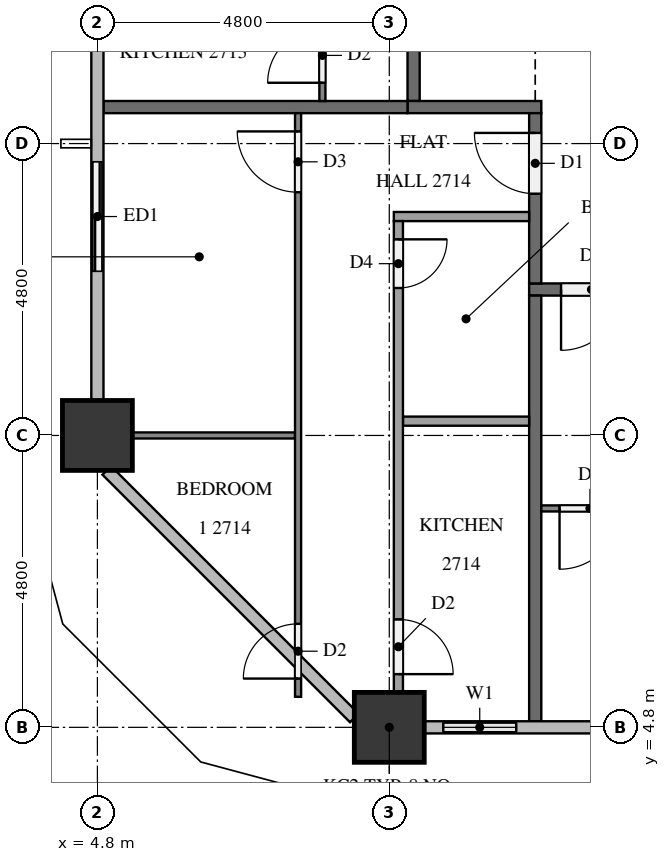
"""IFC4 building model, lengths in metres.
Left out: names, types, materials, properties, quantities, classifications, styles, units other than length and angle.
Written with IfcOpenShell. Run it as: python <this file> out.ifc"""

import sys

from ifc_helpers import new_model, si_unit, direction, frame, frame_2d, origin, origin_2d, place, context, subcontext, project, spatial, rectangle, extrude, element, fill, save


model = new_model("IFC4")
c1 = context("Model", 3, precision=1e-05, world=origin(), true_north=direction((0.0, 1.0)))
c2 = subcontext(c1, "Body", "Model", "MODEL_VIEW")
j1 = project(units=[si_unit("LENGTHUNIT", "METRE"), si_unit("PLANEANGLEUNIT", "RADIAN")], contexts=[c1])
p1 = place(None, origin())
s1 = spatial("IfcSite", under=j1, at=p1, CompositionType="ELEMENT")
p2 = place(p1, origin())
s2 = spatial("IfcBuilding", under=s1, at=p2, CompositionType="ELEMENT")
p3 = place(p2, frame((0.0, 0.0, 106.7)))
s3 = spatial("IfcBuildingStorey", under=s2, at=p3, CompositionType="ELEMENT", Elevation=106.7)
for number, where, z_axis, x_axis in (
    (1, (9.6, 4.8, 0.0), (0.0, 0.0, 1.0), (1.0, 0.0, 0.0)),
    (2, (4.8, 9.6, 0.0), (0.0, 0.0, 1.0), (1.0, 0.0, 0.0)),
):
    element("IfcColumn", number, at=place(p3, frame(where, z_axis=z_axis, x_axis=x_axis)), inside=s3, PredefinedType="COLUMN", context=c2, shape_type="SweptSolid", body=[
        extrude(rectangle(XDim=1.15, YDim=1.15, at=origin_2d()), origin(), (0.0, 0.0, 1.0), 3.2),
    ])
p4 = place(p3, frame((10.175, 4.8, 0.0), z_axis=(0.0, 0.0, 1.0), x_axis=(1.0, 0.0, 0.0)))
e3 = element("IfcWall", 3, at=p4, inside=s3, PredefinedType="SOLIDWALL", context=c2, shape_type="SweptSolid", body=[
    extrude(rectangle(XDim=1.825, YDim=0.15, at=frame_2d((0.913, 0.0))), origin(), (0.0, 0.0, 1.0), 3.2),
])
p5 = place(p4, frame((0.312, 0.0, 0.9)))
e4 = element("IfcOpeningElement", 4, at=p5, cuts=e3, PredefinedType="OPENING", context=c2, shape_type="SweptSolid", body=[
    extrude(rectangle(XDim=1.2, YDim=1.4, at=frame_2d((0.6, 0.7))), frame((0.0, 0.085, 0.0), z_axis=(0.0, -1.0, 0.0), x_axis=(1.0, 0.0, 0.0)), (0.0, 0.0, 1.0), 0.17),
])
p6 = place(p3, frame((4.8, 14.4, 0.0), z_axis=(0.0, 0.0, 1.0), x_axis=(0.0, -1.0, 0.0)))
e5 = element("IfcWall", 5, at=p6, inside=s3, PredefinedType="SOLIDWALL", context=c2, shape_type="SweptSolid", body=[
    extrude(rectangle(XDim=2.4, YDim=0.15, at=frame_2d((1.2, 0.0))), origin(), (0.0, 0.0, 1.0), 3.2),
])
p7 = place(p6, frame((0.3, 0.0, 0.0)))
e6 = element("IfcOpeningElement", 6, at=p7, cuts=e5, PredefinedType="OPENING", context=c2, shape_type="SweptSolid", body=[
    extrude(rectangle(XDim=1.8, YDim=2.4, at=frame_2d((0.9, 1.2))), frame((0.0, 0.085, 0.0), z_axis=(0.0, -1.0, 0.0), x_axis=(1.0, 0.0, 0.0)), (0.0, 0.0, 1.0), 0.17),
])
p8 = place(p3, frame((50.5, 12.0, 0.0), z_axis=(0.0, 0.0, 1.0), x_axis=(-1.0, 0.0, 0.0)))
e7 = element("IfcWall", 7, at=p8, inside=s3, PredefinedType="PARTITIONING", context=c2, shape_type="SweptSolid", body=[
    extrude(rectangle(XDim=38.6, YDim=0.2, at=frame_2d((19.3, 0.0))), origin(), (0.0, 0.0, 1.0), 3.2),
])
p9 = place(p8, frame((37.075, 0.0, 0.0)))
e8 = element("IfcOpeningElement", 8, at=p9, cuts=e7, PredefinedType="OPENING", context=c2, shape_type="SweptSolid", body=[
    extrude(rectangle(XDim=1.0, YDim=2.1, at=frame_2d((0.5, 1.05))), frame((0.0, 0.11, 0.0), z_axis=(0.0, -1.0, 0.0), x_axis=(1.0, 0.0, 0.0)), (0.0, 0.0, 1.0), 0.22),
])
p10 = place(p8, frame((22.675, 0.0, 0.0)))
e9 = element("IfcOpeningElement", 9, at=p10, cuts=e7, PredefinedType="OPENING", context=c2, shape_type="SweptSolid", body=[
    extrude(rectangle(XDim=1.0, YDim=2.1, at=frame_2d((0.5, 1.05))), frame((0.0, 0.11, 0.0), z_axis=(0.0, -1.0, 0.0), x_axis=(1.0, 0.0, 0.0)), (0.0, 0.0, 1.0), 0.22),
])
p11 = place(p8, frame((0.525, 0.0, 0.0)))
e10 = element("IfcOpeningElement", 10, at=p11, cuts=e7, PredefinedType="OPENING", context=c2, shape_type="SweptSolid", body=[
    extrude(rectangle(XDim=1.0, YDim=2.1, at=frame_2d((0.5, 1.05))), frame((0.0, 0.11, 0.0), z_axis=(0.0, -1.0, 0.0), x_axis=(1.0, 0.0, 0.0)), (0.0, 0.0, 1.0), 0.22),
])
p12 = place(p3, frame((10.0, 15.1, 0.0), z_axis=(0.0, 0.0, 1.0), x_axis=(0.0, 1.0, 0.0)))
e11 = element("IfcWall", 11, at=p12, inside=s3, PredefinedType="PARTITIONING", context=c2, shape_type="SweptSolid", body=[
    extrude(rectangle(XDim=22.6, YDim=0.2, at=frame_2d((11.3, 0.0))), origin(), (0.0, 0.0, 1.0), 3.2),
])
p13 = place(p12, frame((21.275, 0.0, 0.0)))
e12 = element("IfcOpeningElement", 12, at=p13, cuts=e11, PredefinedType="OPENING", context=c2, shape_type="SweptSolid", body=[
    extrude(rectangle(XDim=1.0, YDim=2.1, at=frame_2d((0.5, 1.05))), frame((0.0, 0.11, 0.0), z_axis=(0.0, -1.0, 0.0), x_axis=(1.0, 0.0, 0.0)), (0.0, 0.0, 1.0), 0.22),
])
p14 = place(p12, frame((7.475, 0.0, 0.0)))
e13 = element("IfcOpeningElement", 13, at=p14, cuts=e11, PredefinedType="OPENING", context=c2, shape_type="SweptSolid", body=[
    extrude(rectangle(XDim=1.0, YDim=2.1, at=frame_2d((0.5, 1.05))), frame((0.0, 0.11, 0.0), z_axis=(0.0, -1.0, 0.0), x_axis=(1.0, 0.0, 0.0)), (0.0, 0.0, 1.0), 0.22),
])
p15 = place(p3, frame((9.9, 15.0, 0.0), z_axis=(0.0, 0.0, 1.0), x_axis=(1.0, 0.0, 0.0)))
e14 = element("IfcWall", 14, at=p15, inside=s3, PredefinedType="PARTITIONING", context=c2, shape_type="SweptSolid", body=[
    extrude(rectangle(XDim=2.2, YDim=0.2, at=frame_2d((1.1, 0.0))), origin(), (0.0, 0.0, 1.0), 3.2),
])
p16 = place(p3, frame((12.0, 12.1, 0.0), z_axis=(0.0, 0.0, 1.0), x_axis=(0.0, 1.0, 0.0)))
e15 = element("IfcWall", 15, at=p16, inside=s3, PredefinedType="PARTITIONING", context=c2, shape_type="SweptSolid", body=[
    extrude(rectangle(XDim=2.8, YDim=0.2, at=frame_2d((1.4, 0.0))), origin(), (0.0, 0.0, 1.0), 3.2),
])
p17 = place(p16, frame((1.475, 0.0, 0.0)))
e16 = element("IfcOpeningElement", 16, at=p17, cuts=e15, PredefinedType="OPENING", context=c2, shape_type="SweptSolid", body=[
    extrude(rectangle(XDim=1.0, YDim=2.1, at=frame_2d((0.5, 1.05))), frame((0.0, 0.11, 0.0), z_axis=(0.0, -1.0, 0.0), x_axis=(1.0, 0.0, 0.0)), (0.0, 0.0, 1.0), 0.22),
])
p18 = place(p3, frame((12.0, 4.9, 0.0), z_axis=(0.0, 0.0, 1.0), x_axis=(0.0, 1.0, 0.0)))
e17 = element("IfcWall", 17, at=p18, inside=s3, PredefinedType="PARTITIONING", context=c2, shape_type="SweptSolid", body=[
    extrude(rectangle(XDim=7.0, YDim=0.2, at=frame_2d((3.5, 0.0))), origin(), (0.0, 0.0, 1.0), 3.2),
])
p19 = place(p3, frame((4.9, 15.0, 0.0), z_axis=(0.0, 0.0, 1.0), x_axis=(1.0, 0.0, 0.0)))
e18 = element("IfcWall", 18, at=p19, inside=s3, PredefinedType="PARTITIONING", context=c2, shape_type="SweptSolid", body=[
    extrude(rectangle(XDim=5.0, YDim=0.2, at=frame_2d((2.5, 0.0))), origin(), (0.0, 0.0, 1.0), 3.2),
])
p20 = place(p3, frame((26.3, 8.4, 0.0), z_axis=(0.0, 0.0, 1.0), x_axis=(-1.0, 0.0, 0.0)))
e19 = element("IfcWall", 19, at=p20, inside=s3, PredefinedType="PARTITIONING", context=c2, shape_type="SweptSolid", body=[
    extrude(rectangle(XDim=14.2, YDim=0.1, at=frame_2d((7.1, 0.0))), origin(), (0.0, 0.0, 1.0), 3.2),
])
p21 = place(p20, frame((12.9, 0.0, 0.0)))
e20 = element("IfcOpeningElement", 20, at=p21, cuts=e19, PredefinedType="OPENING", context=c2, shape_type="SweptSolid", body=[
    extrude(rectangle(XDim=1.0, YDim=2.1, at=frame_2d((0.5, 1.05))), frame((0.0, 0.06, 0.0), z_axis=(0.0, -1.0, 0.0), x_axis=(1.0, 0.0, 0.0)), (0.0, 0.0, 1.0), 0.12),
])
p22 = place(p20, frame((5.05, 0.0, 0.0)))
e21 = element("IfcOpeningElement", 21, at=p22, cuts=e19, PredefinedType="OPENING", context=c2, shape_type="SweptSolid", body=[
    extrude(rectangle(XDim=0.9, YDim=2.1, at=frame_2d((0.45, 1.05))), frame((0.0, 0.06, 0.0), z_axis=(0.0, -1.0, 0.0), x_axis=(1.0, 0.0, 0.0)), (0.0, 0.0, 1.0), 0.12),
])
p23 = place(p20, frame((3.45, 0.0, 0.0)))
e22 = element("IfcOpeningElement", 22, at=p23, cuts=e19, PredefinedType="OPENING", context=c2, shape_type="SweptSolid", body=[
    extrude(rectangle(XDim=0.9, YDim=2.1, at=frame_2d((0.45, 1.05))), frame((0.0, 0.06, 0.0), z_axis=(0.0, -1.0, 0.0), x_axis=(1.0, 0.0, 0.0)), (0.0, 0.0, 1.0), 0.12),
])
p24 = place(p3, frame((8.5, 15.1, 0.0), z_axis=(0.0, 0.0, 1.0), x_axis=(0.0, 1.0, 0.0)))
e23 = element("IfcWall", 23, at=p24, inside=s3, PredefinedType="PARTITIONING", context=c2, shape_type="SweptSolid", body=[
    extrude(rectangle(XDim=8.8, YDim=0.1, at=frame_2d((4.4, 0.0))), origin(), (0.0, 0.0, 1.0), 3.2),
])
p25 = place(p24, frame((4.45, 0.0, 0.0)))
e24 = element("IfcOpeningElement", 24, at=p25, cuts=e23, PredefinedType="OPENING", context=c2, shape_type="SweptSolid", body=[
    extrude(rectangle(XDim=1.0, YDim=2.1, at=frame_2d((0.5, 1.05))), frame((0.0, 0.06, 0.0), z_axis=(0.0, -1.0, 0.0), x_axis=(1.0, 0.0, 0.0)), (0.0, 0.0, 1.0), 0.12),
])
p26 = place(p24, frame((2.95, 0.0, 0.0)))
e25 = element("IfcOpeningElement", 25, at=p26, cuts=e23, PredefinedType="OPENING", context=c2, shape_type="SweptSolid", body=[
    extrude(rectangle(XDim=0.8, YDim=2.1, at=frame_2d((0.4, 1.05))), frame((0.0, 0.06, 0.0), z_axis=(0.0, -1.0, 0.0), x_axis=(1.0, 0.0, 0.0)), (0.0, 0.0, 1.0), 0.12),
])
p27 = place(p24, frame((0.3, 0.0, 0.0)))
e26 = element("IfcOpeningElement", 26, at=p27, cuts=e23, PredefinedType="OPENING", context=c2, shape_type="SweptSolid", body=[
    extrude(rectangle(XDim=0.9, YDim=2.1, at=frame_2d((0.45, 1.05))), frame((0.0, 0.06, 0.0), z_axis=(0.0, -1.0, 0.0), x_axis=(1.0, 0.0, 0.0)), (0.0, 0.0, 1.0), 0.12),
])
p28 = place(p3, frame((8.05, 9.6, 0.0), z_axis=(0.0, 0.0, 1.0), x_axis=(-1.0, 0.0, 0.0)))
e27 = element("IfcWall", 27, at=p28, inside=s3, PredefinedType="PARTITIONING", context=c2, shape_type="SweptSolid", body=[
    extrude(rectangle(XDim=2.675, YDim=0.1, at=frame_2d((1.337, 0.0))), origin(), (0.0, 0.0, 1.0), 3.2),
])
p29 = place(p3, frame((8.1, 5.302, 0.0), z_axis=(0.0, 0.0, 1.0), x_axis=(0.0, 1.0, 0.0)))
e28 = element("IfcWall", 28, at=p29, inside=s3, PredefinedType="PARTITIONING", context=c2, shape_type="SweptSolid", body=[
    extrude(rectangle(XDim=9.598, YDim=0.1, at=frame_2d((4.799, 0.0))), origin(), (0.0, 0.0, 1.0), 3.2),
])
p30 = place(p29, frame((8.298, 0.0, 0.0)))
e29 = element("IfcOpeningElement", 29, at=p30, cuts=e28, PredefinedType="OPENING", context=c2, shape_type="SweptSolid", body=[
    extrude(rectangle(XDim=1.0, YDim=2.1, at=frame_2d((0.5, 1.05))), frame((0.0, 0.06, 0.0), z_axis=(0.0, -1.0, 0.0), x_axis=(1.0, 0.0, 0.0)), (0.0, 0.0, 1.0), 0.12),
])
p31 = place(p29, frame((0.3, 0.0, 0.0)))
e30 = element("IfcOpeningElement", 30, at=p31, cuts=e28, PredefinedType="OPENING", context=c2, shape_type="SweptSolid", body=[
    extrude(rectangle(XDim=0.9, YDim=2.1, at=frame_2d((0.45, 1.05))), frame((0.0, 0.06, 0.0), z_axis=(0.0, -1.0, 0.0), x_axis=(1.0, 0.0, 0.0)), (0.0, 0.0, 1.0), 0.12),
])
p32 = place(p3, frame((11.9, 9.835, 0.0), z_axis=(0.0, 0.0, 1.0), x_axis=(-1.0, 0.0, 0.0)))
e31 = element("IfcWall", 31, at=p32, inside=s3, PredefinedType="PARTITIONING", context=c2, shape_type="SweptSolid", body=[
    extrude(rectangle(XDim=2.075, YDim=0.15, at=frame_2d((1.038, 0.0))), origin(), (0.0, 0.0, 1.0), 3.2),
])
p33 = place(p3, frame((11.9, 13.2, 0.0), z_axis=(0.0, 0.0, 1.0), x_axis=(-1.0, 0.0, 0.0)))
e32 = element("IfcWall", 32, at=p33, inside=s3, PredefinedType="PARTITIONING", context=c2, shape_type="SweptSolid", body=[
    extrude(rectangle(XDim=2.225, YDim=0.15, at=frame_2d((1.112, 0.0))), origin(), (0.0, 0.0, 1.0), 3.2),
])
p34 = place(p3, frame((9.75, 13.125, 0.0), z_axis=(0.0, 0.0, 1.0), x_axis=(0.0, -1.0, 0.0)))
e33 = element("IfcWall", 33, at=p34, inside=s3, PredefinedType="PARTITIONING", context=c2, shape_type="SweptSolid", body=[
    extrude(rectangle(XDim=7.75, YDim=0.15, at=frame_2d((3.875, 0.0))), origin(), (0.0, 0.0, 1.0), 3.2),
])
p35 = place(p34, frame((0.3, 0.0, 0.0)))
e34 = element("IfcOpeningElement", 34, at=p35, cuts=e33, PredefinedType="OPENING", context=c2, shape_type="SweptSolid", body=[
    extrude(rectangle(XDim=0.8, YDim=2.1, at=frame_2d((0.4, 1.05))), frame((0.0, 0.085, 0.0), z_axis=(0.0, -1.0, 0.0), x_axis=(1.0, 0.0, 0.0)), (0.0, 0.0, 1.0), 0.17),
])
p36 = place(p34, frame((6.55, 0.0, 0.0)))
e35 = element("IfcOpeningElement", 35, at=p36, cuts=e33, PredefinedType="OPENING", context=c2, shape_type="SweptSolid", body=[
    extrude(rectangle(XDim=0.9, YDim=2.1, at=frame_2d((0.45, 1.05))), frame((0.0, 0.085, 0.0), z_axis=(0.0, -1.0, 0.0), x_axis=(1.0, 0.0, 0.0)), (0.0, 0.0, 1.0), 0.17),
])
p37 = place(p5, origin())
e36 = element("IfcWindow", 36, at=p37, inside=s3, PartitioningType="SINGLE_PANEL", PredefinedType="WINDOW", context=c2, shape_type="SweptSolid", body=[
    extrude(rectangle(XDim=1.2, YDim=1.4, at=frame_2d((0.6, 0.7))), frame((0.0, 0.03, 0.0), z_axis=(0.0, -1.0, 0.0), x_axis=(1.0, 0.0, 0.0)), (0.0, 0.0, 1.0), 0.06),
])
fill(e4, e36)
p38 = place(p7, origin())
e37 = element("IfcDoor", 37, at=p38, inside=s3, OperationType="SLIDING_TO_RIGHT", PredefinedType="DOOR", context=c2, shape_type="SweptSolid", body=[
    extrude(rectangle(XDim=1.8, YDim=2.4, at=frame_2d((0.9, 1.2))), frame((0.0, 0.025, 0.0), z_axis=(0.0, -1.0, 0.0), x_axis=(1.0, 0.0, 0.0)), (0.0, 0.0, 1.0), 0.05),
])
fill(e6, e37)
p39 = place(p9, origin())
e38 = element("IfcDoor", 38, at=p39, inside=s3, OperationType="SINGLE_SWING_RIGHT", PredefinedType="DOOR", context=c2, shape_type="SweptSolid", body=[
    extrude(rectangle(XDim=1.0, YDim=2.1, at=frame_2d((0.5, 1.05))), frame((0.0, 0.025, 0.0), z_axis=(0.0, -1.0, 0.0), x_axis=(1.0, 0.0, 0.0)), (0.0, 0.0, 1.0), 0.05),
])
fill(e8, e38)
p40 = place(p17, origin())
e39 = element("IfcDoor", 39, at=p40, inside=s3, OperationType="SINGLE_SWING_RIGHT", PredefinedType="DOOR", context=c2, shape_type="SweptSolid", body=[
    extrude(rectangle(XDim=1.0, YDim=2.1, at=frame_2d((0.5, 1.05))), frame((0.0, 0.025, 0.0), z_axis=(0.0, -1.0, 0.0), x_axis=(1.0, 0.0, 0.0)), (0.0, 0.0, 1.0), 0.05),
])
fill(e16, e39)
p41 = place(p21, origin())
e40 = element("IfcDoor", 40, at=p41, inside=s3, OperationType="SINGLE_SWING_RIGHT", PredefinedType="DOOR", context=c2, shape_type="SweptSolid", body=[
    extrude(rectangle(XDim=1.0, YDim=2.1, at=frame_2d((0.5, 1.05))), frame((0.0, 0.025, 0.0), z_axis=(0.0, -1.0, 0.0), x_axis=(1.0, 0.0, 0.0)), (0.0, 0.0, 1.0), 0.05),
])
fill(e20, e40)
p42 = place(p27, origin())
e41 = element("IfcDoor", 41, at=p42, inside=s3, OperationType="SINGLE_SWING_LEFT", PredefinedType="DOOR", context=c2, shape_type="SweptSolid", body=[
    extrude(rectangle(XDim=0.9, YDim=2.1, at=frame_2d((0.45, 1.05))), frame((0.0, 0.025, 0.0), z_axis=(0.0, -1.0, 0.0), x_axis=(1.0, 0.0, 0.0)), (0.0, 0.0, 1.0), 0.05),
])
fill(e26, e41)
p43 = place(p30, origin())
e42 = element("IfcDoor", 42, at=p43, inside=s3, OperationType="SINGLE_SWING_RIGHT", PredefinedType="DOOR", context=c2, shape_type="SweptSolid", body=[
    extrude(rectangle(XDim=1.0, YDim=2.1, at=frame_2d((0.5, 1.05))), frame((0.0, 0.025, 0.0), z_axis=(0.0, -1.0, 0.0), x_axis=(1.0, 0.0, 0.0)), (0.0, 0.0, 1.0), 0.05),
])
fill(e29, e42)
p44 = place(p31, origin())
e43 = element("IfcDoor", 43, at=p44, inside=s3, OperationType="SINGLE_SWING_LEFT", PredefinedType="DOOR", context=c2, shape_type="SweptSolid", body=[
    extrude(rectangle(XDim=0.9, YDim=2.1, at=frame_2d((0.45, 1.05))), frame((0.0, 0.025, 0.0), z_axis=(0.0, -1.0, 0.0), x_axis=(1.0, 0.0, 0.0)), (0.0, 0.0, 1.0), 0.05),
])
fill(e30, e43)
p45 = place(p35, origin())
e44 = element("IfcDoor", 44, at=p45, inside=s3, OperationType="SINGLE_SWING_LEFT", PredefinedType="DOOR", context=c2, shape_type="SweptSolid", body=[
    extrude(rectangle(XDim=0.8, YDim=2.1, at=frame_2d((0.4, 1.05))), frame((0.0, 0.025, 0.0), z_axis=(0.0, -1.0, 0.0), x_axis=(1.0, 0.0, 0.0)), (0.0, 0.0, 1.0), 0.05),
])
fill(e34, e44)
p46 = place(p36, origin())
e45 = element("IfcDoor", 45, at=p46, inside=s3, OperationType="SINGLE_SWING_RIGHT", PredefinedType="DOOR", context=c2, shape_type="SweptSolid", body=[
    extrude(rectangle(XDim=0.9, YDim=2.1, at=frame_2d((0.45, 1.05))), frame((0.0, 0.025, 0.0), z_axis=(0.0, -1.0, 0.0), x_axis=(1.0, 0.0, 0.0)), (0.0, 0.0, 1.0), 0.05),
])
fill(e35, e45)
save(model, sys.argv[1])
